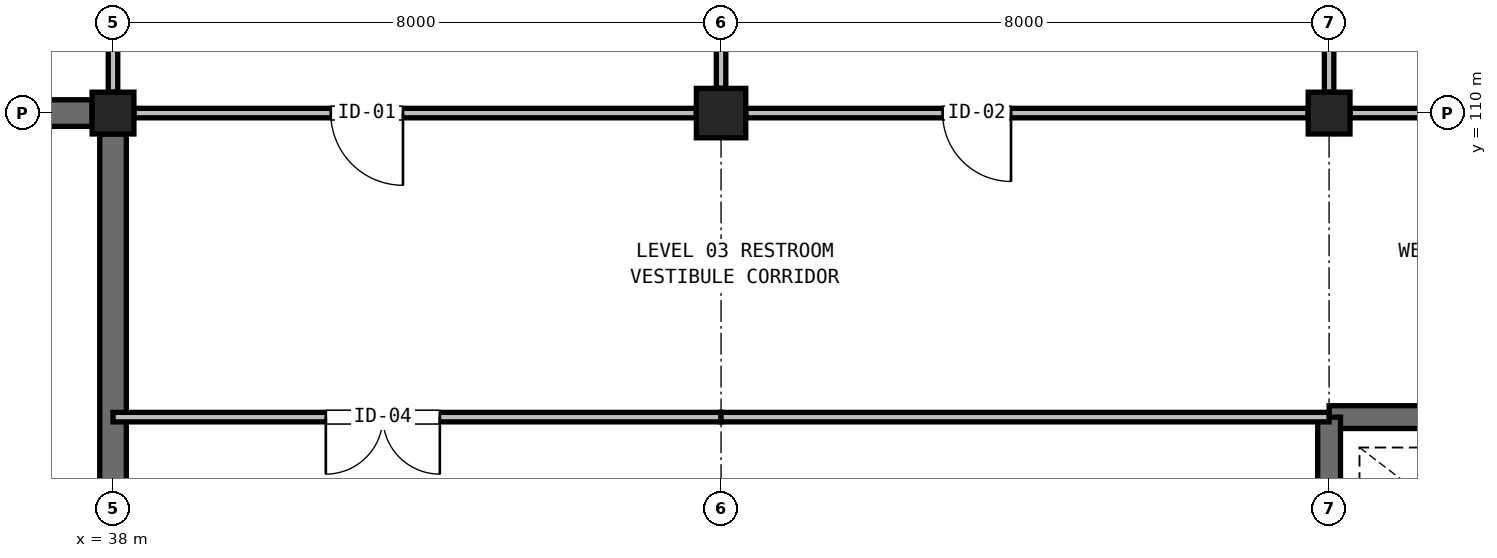
"""IFC4 building model, lengths in metres.
Left out: names, types, materials, properties, quantities, classifications, styles, units other than length and angle.
Written with IfcOpenShell. Run it as: python <this file> out.ifc"""

import sys

from ifc_helpers import new_model, si_unit, direction, frame, frame_2d, origin, origin_2d, place, context, subcontext, project, spatial, rectangle, extrude, element, fill, save


model = new_model("IFC4")
c1 = context("Model", 3, precision=1e-05, world=origin(), true_north=direction((0.0, 1.0)))
c2 = subcontext(c1, "Body", "Model", "MODEL_VIEW")
j1 = project(units=[si_unit("LENGTHUNIT", "METRE"), si_unit("PLANEANGLEUNIT", "RADIAN")], contexts=[c1])
p1 = place(None, origin())
s1 = spatial("IfcSite", under=j1, at=p1, CompositionType="ELEMENT")
p2 = place(p1, origin())
s2 = spatial("IfcBuilding", under=s1, at=p2, CompositionType="ELEMENT")
p3 = place(p2, frame((0.0, 0.0, 15.0)))
s3 = spatial("IfcBuildingStorey", under=s2, at=p3, CompositionType="ELEMENT", Elevation=15.0)
p4 = place(p3, frame((38.0, 110.0, 0.0), z_axis=(0.0, 0.0, 1.0), x_axis=(1.0, 0.0, 0.0)))
e1 = element("IfcColumn", 1, at=p4, inside=s3, PredefinedType="COLUMN", context=c2, shape_type="SweptSolid", body=[
    extrude(rectangle(XDim=0.55, YDim=0.55, at=origin_2d()), origin(), (0.0, 0.0, 1.0), 4.2),
])
p5 = place(p3, frame((46.0, 110.0, 0.0), z_axis=(0.0, 0.0, 1.0), x_axis=(1.0, 0.0, 0.0)))
e2 = element("IfcColumn", 2, at=p5, inside=s3, PredefinedType="COLUMN", context=c2, shape_type="SweptSolid", body=[
    extrude(rectangle(XDim=0.65, YDim=0.65, at=origin_2d()), origin(), (0.0, 0.0, 1.0), 4.2),
])
p6 = place(p3, frame((54.0, 110.0, 0.0), z_axis=(0.0, 0.0, 1.0), x_axis=(1.0, 0.0, 0.0)))
e3 = element("IfcColumn", 3, at=p6, inside=s3, PredefinedType="COLUMN", context=c2, shape_type="SweptSolid", body=[
    extrude(rectangle(XDim=0.55, YDim=0.55, at=origin_2d()), origin(), (0.0, 0.0, 1.0), 4.2),
])
for number, where, z_axis, x_axis in (
    (4, (30.3, 110.0, 0.0), (0.0, 0.0, 1.0), (1.0, 0.0, 0.0)),
    (5, (38.0, 102.3, 0.0), (0.0, 0.0, 1.0), (0.0, 1.0, 0.0)),
):
    element("IfcWall", number, at=place(p3, frame(where, z_axis=z_axis, x_axis=x_axis)), inside=s3, PredefinedType="SHEAR", context=c2, shape_type="SweptSolid", body=[
        extrude(rectangle(XDim=7.425, YDim=0.35, at=frame_2d((3.712, 0.0))), origin(), (0.0, 0.0, 1.0), 3.98),
    ])
p7 = place(p3, frame((54.0, 106.0, 0.0), z_axis=(0.0, 0.0, 1.0), x_axis=(1.0, 0.0, 0.0)))
e6 = element("IfcWall", 6, at=p7, inside=s3, PredefinedType="SHEAR", context=c2, shape_type="SweptSolid", body=[
    extrude(rectangle(XDim=8.0, YDim=0.3, at=frame_2d((4.0, 0.0))), origin(), (0.0, 0.0, 1.0), 3.98),
])
p8 = place(p3, frame((54.0, 102.3, 0.0), z_axis=(0.0, 0.0, 1.0), x_axis=(0.0, 1.0, 0.0)))
e7 = element("IfcWall", 7, at=p8, inside=s3, PredefinedType="SHEAR", context=c2, shape_type="SweptSolid", body=[
    extrude(rectangle(XDim=3.7, YDim=0.3, at=frame_2d((1.85, 0.0))), origin(), (0.0, 0.0, 1.0), 3.98),
])
p9 = place(p3, frame((38.0, 110.275, 0.0), z_axis=(0.0, 0.0, 1.0), x_axis=(0.0, 1.0, 0.0)))
e8 = element("IfcWall", 8, at=p9, inside=s3, PredefinedType="PARTITIONING", context=c2, shape_type="SweptSolid", body=[
    extrude(rectangle(XDim=5.525, YDim=0.125, at=frame_2d((2.763, 0.0))), origin(), (0.0, 0.0, 1.0), 3.15),
])
p10 = place(p3, frame((38.0, 106.0, 0.0), z_axis=(0.0, 0.0, 1.0), x_axis=(1.0, 0.0, 0.0)))
e9 = element("IfcWall", 9, at=p10, inside=s3, PredefinedType="PARTITIONING", context=c2, shape_type="SweptSolid", body=[
    extrude(rectangle(XDim=8.0, YDim=0.125, at=frame_2d((4.0, 0.0))), origin(), (0.0, 0.0, 1.0), 3.9),
])
p11 = place(p10, frame((2.8, 0.0, 0.0)))
e10 = element("IfcOpeningElement", 10, at=p11, cuts=e9, PredefinedType="OPENING", context=c2, shape_type="SweptSolid", body=[
    extrude(rectangle(XDim=1.5, YDim=2.2, at=frame_2d((0.75, 1.1))), frame((0.0, 0.073, 0.0), z_axis=(0.0, -1.0, 0.0), x_axis=(1.0, 0.0, 0.0)), (0.0, 0.0, 1.0), 0.145),
])
p12 = place(p3, frame((46.0, 106.0, 0.0), z_axis=(0.0, 0.0, 1.0), x_axis=(1.0, 0.0, 0.0)))
e11 = element("IfcWall", 11, at=p12, inside=s3, PredefinedType="PARTITIONING", context=c2, shape_type="SweptSolid", body=[
    extrude(rectangle(XDim=8.0, YDim=0.125, at=frame_2d((4.0, 0.0))), origin(), (0.0, 0.0, 1.0), 3.9),
])
p13 = place(p3, frame((38.275, 110.0, 0.0), z_axis=(0.0, 0.0, 1.0), x_axis=(1.0, 0.0, 0.0)))
e12 = element("IfcWall", 12, at=p13, inside=s3, PredefinedType="PARTITIONING", context=c2, shape_type="SweptSolid", body=[
    extrude(rectangle(XDim=7.4, YDim=0.125, at=frame_2d((3.7, 0.0))), origin(), (0.0, 0.0, 1.0), 3.03),
])
p14 = place(p13, frame((2.59, 0.0, 0.0)))
e13 = element("IfcOpeningElement", 13, at=p14, cuts=e12, PredefinedType="OPENING", context=c2, shape_type="SweptSolid", body=[
    extrude(rectangle(XDim=0.95, YDim=2.1, at=frame_2d((0.475, 1.05))), frame((0.0, 0.073, 0.0), z_axis=(0.0, -1.0, 0.0), x_axis=(1.0, 0.0, 0.0)), (0.0, 0.0, 1.0), 0.145),
])
p15 = place(p3, frame((46.325, 110.0, 0.0), z_axis=(0.0, 0.0, 1.0), x_axis=(1.0, 0.0, 0.0)))
e14 = element("IfcWall", 14, at=p15, inside=s3, PredefinedType="PARTITIONING", context=c2, shape_type="SweptSolid", body=[
    extrude(rectangle(XDim=7.4, YDim=0.125, at=frame_2d((3.7, 0.0))), origin(), (0.0, 0.0, 1.0), 3.43),
])
p16 = place(p15, frame((2.59, 0.0, 0.0)))
e15 = element("IfcOpeningElement", 15, at=p16, cuts=e14, PredefinedType="OPENING", context=c2, shape_type="SweptSolid", body=[
    extrude(rectangle(XDim=0.9, YDim=2.1, at=frame_2d((0.45, 1.05))), frame((0.0, 0.073, 0.0), z_axis=(0.0, -1.0, 0.0), x_axis=(1.0, 0.0, 0.0)), (0.0, 0.0, 1.0), 0.145),
])
p17 = place(p3, frame((54.275, 110.0, 0.0), z_axis=(0.0, 0.0, 1.0), x_axis=(1.0, 0.0, 0.0)))
e16 = element("IfcWall", 16, at=p17, inside=s3, PredefinedType="PARTITIONING", context=c2, shape_type="SweptSolid", body=[
    extrude(rectangle(XDim=11.725, YDim=0.125, at=frame_2d((5.863, 0.0))), origin(), (0.0, 0.0, 1.0), 3.03),
])
p18 = place(p17, frame((4.69, 0.0, 0.0)))
e17 = element("IfcOpeningElement", 17, at=p18, cuts=e16, PredefinedType="OPENING", context=c2, shape_type="SweptSolid", body=[
    extrude(rectangle(XDim=1.4, YDim=2.2, at=frame_2d((0.7, 1.1))), frame((0.0, 0.073, 0.0), z_axis=(0.0, -1.0, 0.0), x_axis=(1.0, 0.0, 0.0)), (0.0, 0.0, 1.0), 0.145),
])
p19 = place(p3, frame((46.0, 110.325, 0.0), z_axis=(0.0, 0.0, 1.0), x_axis=(0.0, 1.0, 0.0)))
e18 = element("IfcWall", 18, at=p19, inside=s3, PredefinedType="PARTITIONING", context=c2, shape_type="SweptSolid", body=[
    extrude(rectangle(XDim=5.475, YDim=0.125, at=frame_2d((2.738, 0.0))), origin(), (0.0, 0.0, 1.0), 3.03),
])
p20 = place(p3, frame((54.0, 110.275, 0.0), z_axis=(0.0, 0.0, 1.0), x_axis=(0.0, 1.0, 0.0)))
e19 = element("IfcWall", 19, at=p20, inside=s3, PredefinedType="PARTITIONING", context=c2, shape_type="SweptSolid", body=[
    extrude(rectangle(XDim=7.4, YDim=0.125, at=frame_2d((3.7, 0.0))), origin(), (0.0, 0.0, 1.0), 2.93),
])
p21 = place(p11, frame((1.5, 0.0, 0.0), z_axis=(0.0, 0.0, 1.0), x_axis=(-1.0, 0.0, 0.0)))
e20 = element("IfcDoor", 20, at=p21, inside=s3, OperationType="DOUBLE_DOOR_SINGLE_SWING", PredefinedType="DOOR", context=c2, shape_type="SweptSolid", body=[
    extrude(rectangle(XDim=1.5, YDim=2.2, at=frame_2d((0.75, 1.1))), frame((0.0, 0.025, 0.0), z_axis=(0.0, -1.0, 0.0), x_axis=(1.0, 0.0, 0.0)), (0.0, 0.0, 1.0), 0.05),
])
fill(e10, e20)
p22 = place(p14, frame((0.95, 0.0, 0.0), z_axis=(0.0, 0.0, 1.0), x_axis=(-1.0, 0.0, 0.0)))
e21 = element("IfcDoor", 21, at=p22, inside=s3, OperationType="SINGLE_SWING_RIGHT", PredefinedType="DOOR", context=c2, shape_type="SweptSolid", body=[
    extrude(rectangle(XDim=0.95, YDim=2.1, at=frame_2d((0.475, 1.05))), frame((0.0, 0.025, 0.0), z_axis=(0.0, -1.0, 0.0), x_axis=(1.0, 0.0, 0.0)), (0.0, 0.0, 1.0), 0.05),
])
fill(e13, e21)
p23 = place(p16, frame((0.9, 0.0, 0.0), z_axis=(0.0, 0.0, 1.0), x_axis=(-1.0, 0.0, 0.0)))
e22 = element("IfcDoor", 22, at=p23, inside=s3, OperationType="SINGLE_SWING_RIGHT", PredefinedType="DOOR", context=c2, shape_type="SweptSolid", body=[
    extrude(rectangle(XDim=0.9, YDim=2.1, at=frame_2d((0.45, 1.05))), frame((0.0, 0.025, 0.0), z_axis=(0.0, -1.0, 0.0), x_axis=(1.0, 0.0, 0.0)), (0.0, 0.0, 1.0), 0.05),
])
fill(e15, e22)
save(model, sys.argv[1])
